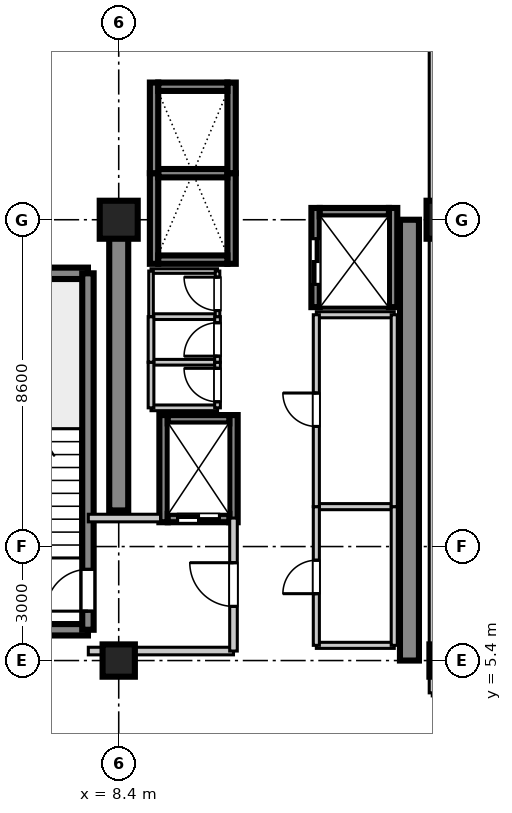
"""IFC4 building model, lengths in metres.
Left out: names, types, materials, properties, quantities, classifications, styles, units other than length and angle.
Written with IfcOpenShell. Run it as: python <this file> out.ifc"""

import sys

from ifc_helpers import new_model, si_unit, direction, frame, frame_2d, origin, origin_2d, place, context, subcontext, project, spatial, rectangle, extrude, source, transform, mapped, element, fill, save


model = new_model("IFC4")
c1 = context("Model", 3, precision=1e-05, world=origin(), true_north=direction((0.0, 1.0)))
c2 = subcontext(c1, "Body", "Model", "MODEL_VIEW")
j1 = project(units=[si_unit("LENGTHUNIT", "METRE"), si_unit("PLANEANGLEUNIT", "RADIAN")], contexts=[c1])
p1 = place(None, origin())
s1 = spatial("IfcSite", under=j1, at=p1, CompositionType="ELEMENT")
p2 = place(p1, origin())
s2 = spatial("IfcBuilding", under=s1, at=p2, CompositionType="ELEMENT")
p3 = place(p2, frame((0.0, 0.0, 212.3)))
s3 = spatial("IfcBuildingStorey", under=s2, at=p3, CompositionType="ELEMENT", Elevation=212.3)
m1 = source(origin(), c2, "Body", "SweptSolid", [
    extrude(rectangle(XDim=0.85, YDim=0.85, at=origin_2d()), origin(), (0.0, 0.0, 1.0), 3.655),
])
p4 = place(p3, frame((8.4, 5.4, 0.0), z_axis=(0.0, 0.0, 1.0), x_axis=(1.0, 0.0, 0.0)))
e1 = element("IfcColumn", 1, at=p4, inside=s3, PredefinedType="PILASTER", context=c2, shape_type="MappedRepresentation", body=[
    mapped(m1, transform((0.0, 0.0, 0.0), scale=1.0)),
])
m2 = source(origin(), c2, "Body", "SweptSolid", [
    extrude(rectangle(XDim=1.0, YDim=1.0, at=origin_2d()), origin(), (0.0, 0.0, 1.0), 3.655),
])
p5 = place(p3, frame((8.4, 17.0, 0.0), z_axis=(0.0, 0.0, 1.0), x_axis=(1.0, 0.0, 0.0)))
e2 = element("IfcColumn", 2, at=p5, inside=s3, PredefinedType="COLUMN", context=c2, shape_type="MappedRepresentation", body=[
    mapped(m2, transform((0.0, 0.0, 0.0), scale=1.0)),
])
p6 = place(p3, frame((17.0, 5.4, 0.0), z_axis=(0.0, 0.0, 1.0), x_axis=(1.0, 0.0, 0.0)))
e3 = element("IfcColumn", 3, at=p6, inside=s3, PredefinedType="PILASTER", context=c2, shape_type="MappedRepresentation", body=[
    mapped(m1, transform((0.0, 0.0, 0.0), scale=1.0)),
])
p7 = place(p3, frame((17.0, 17.0, 0.0), z_axis=(0.0, 0.0, 1.0), x_axis=(1.0, 0.0, 0.0)))
e4 = element("IfcColumn", 4, at=p7, inside=s3, PredefinedType="COLUMN", context=c2, shape_type="MappedRepresentation", body=[
    mapped(m2, transform((0.0, 0.0, 0.0), scale=1.0)),
])
m3 = source(origin(), c2, "Body", "SweptSolid", [
    extrude(rectangle(XDim=7.65, YDim=0.5, at=frame_2d((3.825, 0.0))), origin(), (0.0, 0.0, 1.0), 3.41),
])
p8 = place(p3, frame((8.4, 9.35, 0.0), z_axis=(0.0, 0.0, 1.0), x_axis=(0.0, 1.0, 0.0)))
e5 = element("IfcWall", 5, at=p8, inside=s3, PredefinedType="SHEAR", context=c2, shape_type="MappedRepresentation", body=[
    mapped(m3, transform((0.0, 0.0, 0.0), scale=1.0)),
])
m4 = source(origin(), c2, "Body", "SweptSolid", [
    extrude(rectangle(XDim=11.6, YDim=0.5, at=frame_2d((5.8, 0.0))), origin(), (0.0, 0.0, 1.0), 3.41),
])
p9 = place(p3, frame((16.05, 5.4, 0.0), z_axis=(0.0, 0.0, 1.0), x_axis=(0.0, 1.0, 0.0)))
e6 = element("IfcWall", 6, at=p9, inside=s3, PredefinedType="SHEAR", context=c2, shape_type="MappedRepresentation", body=[
    mapped(m4, transform((0.0, 0.0, 0.0), scale=1.0)),
])
m5 = source(origin(), c2, "Body", "SweptSolid", [
    extrude(rectangle(XDim=3.98, YDim=0.3, at=frame_2d((1.99, 0.0))), origin(), (0.0, 0.0, 1.0), 3.41),
])
for number, where, z_axis, x_axis in (
    (7, (3.61, 6.21, 0.0), (0.0, 0.0, 1.0), (1.0, 0.0, 0.0)),
    (8, (3.61, 15.59, 0.0), (0.0, 0.0, 1.0), (1.0, 0.0, 0.0)),
):
    element("IfcWall", number, at=place(p3, frame(where, z_axis=z_axis, x_axis=x_axis)), inside=s3, PredefinedType="SHEAR", context=c2, shape_type="MappedRepresentation", body=[
        mapped(m5, transform((0.0, 0.0, 0.0), scale=1.0)),
    ])
m6 = source(origin(), c2, "Body", "SweptSolid", [
    extrude(rectangle(XDim=9.38, YDim=0.3, at=frame_2d((4.69, 0.0))), origin(), (0.0, 0.0, 1.0), 3.41),
])
p10 = place(p3, frame((7.59, 6.21, 0.0), z_axis=(0.0, 0.0, 1.0), x_axis=(0.0, 1.0, 0.0)))
e9 = element("IfcWall", 9, at=p10, inside=s3, PredefinedType="SHEAR", context=c2, shape_type="MappedRepresentation", body=[
    mapped(m6, transform((0.0, 0.0, 0.0), scale=1.0)),
])
p11 = place(p10, frame((0.49, 0.0, 0.0)))
e10 = element("IfcOpeningElement", 10, at=p11, cuts=e9, PredefinedType="OPENING", context=c2, shape_type="SweptSolid", body=[
    extrude(rectangle(XDim=1.1, YDim=2.15, at=frame_2d((0.55, 1.075))), frame((0.0, 0.16, 0.0), z_axis=(0.0, -1.0, 0.0), x_axis=(1.0, 0.0, 0.0)), (0.0, 0.0, 1.0), 0.32),
])
m7 = source(origin(), c2, "Body", "SweptSolid", [
    extrude(rectangle(XDim=2.385, YDim=0.22, at=frame_2d((1.192, 0.0))), origin(), (0.0, 0.0, 1.0), 3.41),
])
for number, where, z_axis, x_axis in (
    (11, (9.33, 15.84, 0.0), (0.0, 0.0, 1.0), (0.0, 1.0, 0.0)),
    (12, (11.37, 15.84, 0.0), (0.0, 0.0, 1.0), (0.0, 1.0, 0.0)),
):
    element("IfcWall", number, at=place(p3, frame(where, z_axis=z_axis, x_axis=x_axis)), inside=s3, PredefinedType="SHEAR", context=c2, shape_type="MappedRepresentation", body=[
        mapped(m7, transform((0.0, 0.0, 0.0), scale=1.0)),
    ])
m8 = source(origin(), c2, "Body", "SweptSolid", [
    extrude(rectangle(XDim=1.82, YDim=0.22, at=frame_2d((0.91, 0.0))), origin(), (0.0, 0.0, 1.0), 3.41),
])
p12 = place(p3, frame((9.44, 15.95, 0.0), z_axis=(0.0, 0.0, 1.0), x_axis=(1.0, 0.0, 0.0)))
e13 = element("IfcWall", 13, at=p12, inside=s3, PredefinedType="SHEAR", context=c2, shape_type="MappedRepresentation", body=[
    mapped(m8, transform((0.0, 0.0, 0.0), scale=1.0)),
])
m9 = source(origin(), c2, "Body", "SweptSolid", [
    extrude(rectangle(XDim=1.82, YDim=0.22, at=frame_2d((0.91, 0.0))), origin(), (0.0, 0.0, 1.0), 3.7),
])
p13 = place(p3, frame((9.44, 18.225, 0.0), z_axis=(0.0, 0.0, 1.0), x_axis=(1.0, 0.0, 0.0)))
e14 = element("IfcWall", 14, at=p13, inside=s3, PredefinedType="SHEAR", context=c2, shape_type="MappedRepresentation", body=[
    mapped(m9, transform((0.0, 0.0, 0.0), scale=1.0)),
])
for number, where, z_axis, x_axis in (
    (15, (9.33, 18.225, 0.0), (0.0, 0.0, 1.0), (0.0, 1.0, 0.0)),
    (16, (11.37, 18.225, 0.0), (0.0, 0.0, 1.0), (0.0, 1.0, 0.0)),
):
    element("IfcWall", number, at=place(p3, frame(where, z_axis=z_axis, x_axis=x_axis)), inside=s3, PredefinedType="SHEAR", context=c2, shape_type="MappedRepresentation", body=[
        mapped(m7, transform((0.0, 0.0, 0.0), scale=1.0)),
    ])
p14 = place(p3, frame((9.44, 20.5, 0.0), z_axis=(0.0, 0.0, 1.0), x_axis=(1.0, 0.0, 0.0)))
e17 = element("IfcWall", 17, at=p14, inside=s3, PredefinedType="SHEAR", context=c2, shape_type="MappedRepresentation", body=[
    mapped(m8, transform((0.0, 0.0, 0.0), scale=1.0)),
])
m10 = source(origin(), c2, "Body", "SweptSolid", [
    extrude(rectangle(XDim=2.82, YDim=0.22, at=frame_2d((1.41, 0.0))), origin(), (0.0, 0.0, 1.0), 3.41),
])
for number, where, z_axis, x_axis in (
    (18, (9.58, 9.04, 0.0), (0.0, 0.0, 1.0), (0.0, 1.0, 0.0)),
    (19, (11.42, 9.04, 0.0), (0.0, 0.0, 1.0), (0.0, 1.0, 0.0)),
):
    element("IfcWall", number, at=place(p3, frame(where, z_axis=z_axis, x_axis=x_axis)), inside=s3, PredefinedType="SHEAR", context=c2, shape_type="MappedRepresentation", body=[
        mapped(m10, transform((0.0, 0.0, 0.0), scale=1.0)),
    ])
m11 = source(origin(), c2, "Body", "SweptSolid", [
    extrude(rectangle(XDim=1.62, YDim=0.22, at=frame_2d((0.81, 0.0))), origin(), (0.0, 0.0, 1.0), 3.41),
])
p15 = place(p3, frame((9.69, 9.15, 0.0), z_axis=(0.0, 0.0, 1.0), x_axis=(1.0, 0.0, 0.0)))
e20 = element("IfcWall", 20, at=p15, inside=s3, PredefinedType="SHEAR", context=c2, shape_type="MappedRepresentation", body=[
    mapped(m11, transform((0.0, 0.0, 0.0), scale=1.0)),
])
p16 = place(p15, frame((0.26, 0.0, 0.0)))
e21 = element("IfcOpeningElement", 21, at=p16, cuts=e20, PredefinedType="OPENING", context=c2, shape_type="SweptSolid", body=[
    extrude(rectangle(XDim=1.1, YDim=2.2, at=frame_2d((0.55, 1.1))), frame((0.0, 0.12, 0.0), z_axis=(0.0, -1.0, 0.0), x_axis=(1.0, 0.0, 0.0)), (0.0, 0.0, 1.0), 0.24),
])
p17 = place(p3, frame((9.69, 11.75, 0.0), z_axis=(0.0, 0.0, 1.0), x_axis=(1.0, 0.0, 0.0)))
e22 = element("IfcWall", 22, at=p17, inside=s3, PredefinedType="SHEAR", context=c2, shape_type="MappedRepresentation", body=[
    mapped(m11, transform((0.0, 0.0, 0.0), scale=1.0)),
])
m12 = source(origin(), c2, "Body", "SweptSolid", [
    extrude(rectangle(XDim=2.61, YDim=0.22, at=frame_2d((1.305, 0.0))), origin(), (0.0, 0.0, 1.0), 3.41),
])
p18 = place(p3, frame((13.58, 14.7, 0.0), z_axis=(0.0, 0.0, 1.0), x_axis=(0.0, 1.0, 0.0)))
e23 = element("IfcWall", 23, at=p18, inside=s3, PredefinedType="SHEAR", context=c2, shape_type="MappedRepresentation", body=[
    mapped(m12, transform((0.0, 0.0, 0.0), scale=1.0)),
])
p19 = place(p18, frame((0.6, 0.0, 0.0)))
e24 = element("IfcOpeningElement", 24, at=p19, cuts=e23, PredefinedType="OPENING", context=c2, shape_type="SweptSolid", body=[
    extrude(rectangle(XDim=1.2, YDim=2.2, at=frame_2d((0.6, 1.1))), frame((0.0, 0.12, 0.0), z_axis=(0.0, -1.0, 0.0), x_axis=(1.0, 0.0, 0.0)), (0.0, 0.0, 1.0), 0.24),
])
p20 = place(p3, frame((15.62, 14.7, 0.0), z_axis=(0.0, 0.0, 1.0), x_axis=(0.0, 1.0, 0.0)))
e25 = element("IfcWall", 25, at=p20, inside=s3, PredefinedType="SHEAR", context=c2, shape_type="MappedRepresentation", body=[
    mapped(m12, transform((0.0, 0.0, 0.0), scale=1.0)),
])
p21 = place(p3, frame((13.69, 17.2, 0.0), z_axis=(0.0, 0.0, 1.0), x_axis=(1.0, 0.0, 0.0)))
e26 = element("IfcWall", 26, at=p21, inside=s3, PredefinedType="SHEAR", context=c2, shape_type="MappedRepresentation", body=[
    mapped(m8, transform((0.0, 0.0, 0.0), scale=1.0)),
])
m13 = source(origin(), c2, "Body", "SweptSolid", [
    extrude(rectangle(XDim=3.82, YDim=0.2, at=frame_2d((1.91, 0.0))), origin(), (0.0, 0.0, 1.0), 2.75),
])
p22 = place(p3, frame((7.6, 5.65, 0.0), z_axis=(0.0, 0.0, 1.0), x_axis=(1.0, 0.0, 0.0)))
e27 = element("IfcWall", 27, at=p22, inside=s3, PredefinedType="PARTITIONING", context=c2, shape_type="MappedRepresentation", body=[
    mapped(m13, transform((0.0, 0.0, 0.0), scale=1.0)),
])
m14 = source(origin(), c2, "Body", "SweptSolid", [
    extrude(rectangle(XDim=1.9, YDim=0.2, at=frame_2d((0.95, 0.0))), origin(), (0.0, 0.0, 1.0), 2.75),
])
p23 = place(p3, frame((7.6, 9.15, 0.0), z_axis=(0.0, 0.0, 1.0), x_axis=(1.0, 0.0, 0.0)))
e28 = element("IfcWall", 28, at=p23, inside=s3, PredefinedType="PARTITIONING", context=c2, shape_type="MappedRepresentation", body=[
    mapped(m14, transform((0.0, 0.0, 0.0), scale=1.0)),
])
m15 = source(origin(), c2, "Body", "SweptSolid", [
    extrude(rectangle(XDim=3.5, YDim=0.2, at=frame_2d((1.75, 0.0))), origin(), (0.0, 0.0, 1.0), 2.75),
])
p24 = place(p3, frame((11.42, 5.65, 0.0), z_axis=(0.0, 0.0, 1.0), x_axis=(0.0, 1.0, 0.0)))
e29 = element("IfcWall", 29, at=p24, inside=s3, PredefinedType="PARTITIONING", context=c2, shape_type="MappedRepresentation", body=[
    mapped(m15, transform((0.0, 0.0, 0.0), scale=1.0)),
])
p25 = place(p24, frame((1.175, 0.0, 0.0)))
e30 = element("IfcOpeningElement", 30, at=p25, cuts=e29, PredefinedType="OPENING", context=c2, shape_type="SweptSolid", body=[
    extrude(rectangle(XDim=1.15, YDim=2.15, at=frame_2d((0.575, 1.075))), frame((0.0, 0.11, 0.0), z_axis=(0.0, -1.0, 0.0), x_axis=(1.0, 0.0, 0.0)), (0.0, 0.0, 1.0), 0.22),
])
m16 = source(origin(), c2, "Body", "SweptSolid", [
    extrude(rectangle(XDim=1.75, YDim=0.15, at=frame_2d((0.875, 0.0))), origin(), (0.0, 0.0, 1.0), 2.75),
])
for number, where, z_axis, x_axis in (
    (31, (9.25, 12.05, 0.0), (0.0, 0.0, 1.0), (1.0, 0.0, 0.0)),
    (32, (9.25, 13.25, 0.0), (0.0, 0.0, 1.0), (1.0, 0.0, 0.0)),
):
    element("IfcWall", number, at=place(p3, frame(where, z_axis=z_axis, x_axis=x_axis)), inside=s3, PredefinedType="PARTITIONING", context=c2, shape_type="MappedRepresentation", body=[
        mapped(m16, transform((0.0, 0.0, 0.0), scale=1.0)),
    ])
m17 = source(origin(), c2, "Body", "SweptSolid", [
    extrude(rectangle(XDim=1.2, YDim=0.15, at=frame_2d((0.6, 0.0))), origin(), (0.0, 0.0, 1.0), 2.75),
])
p26 = place(p3, frame((9.25, 12.05, 0.0), z_axis=(0.0, 0.0, 1.0), x_axis=(0.0, 1.0, 0.0)))
e33 = element("IfcWall", 33, at=p26, inside=s3, PredefinedType="PARTITIONING", context=c2, shape_type="MappedRepresentation", body=[
    mapped(m17, transform((0.0, 0.0, 0.0), scale=1.0)),
])
p27 = place(p3, frame((11.0, 12.05, 0.0), z_axis=(0.0, 0.0, 1.0), x_axis=(0.0, 1.0, 0.0)))
e34 = element("IfcWall", 34, at=p27, inside=s3, PredefinedType="PARTITIONING", context=c2, shape_type="MappedRepresentation", body=[
    mapped(m17, transform((0.0, 0.0, 0.0), scale=1.0)),
])
p28 = place(p27, frame((0.16, 0.0, 0.0)))
e35 = element("IfcOpeningElement", 35, at=p28, cuts=e34, PredefinedType="OPENING", context=c2, shape_type="SweptSolid", body=[
    extrude(rectangle(XDim=0.88, YDim=2.1, at=frame_2d((0.44, 1.05))), frame((0.0, 0.085, 0.0), z_axis=(0.0, -1.0, 0.0), x_axis=(1.0, 0.0, 0.0)), (0.0, 0.0, 1.0), 0.17),
])
p29 = place(p3, frame((9.25, 14.45, 0.0), z_axis=(0.0, 0.0, 1.0), x_axis=(1.0, 0.0, 0.0)))
e36 = element("IfcWall", 36, at=p29, inside=s3, PredefinedType="PARTITIONING", context=c2, shape_type="MappedRepresentation", body=[
    mapped(m16, transform((0.0, 0.0, 0.0), scale=1.0)),
])
p30 = place(p3, frame((9.25, 13.25, 0.0), z_axis=(0.0, 0.0, 1.0), x_axis=(0.0, 1.0, 0.0)))
e37 = element("IfcWall", 37, at=p30, inside=s3, PredefinedType="PARTITIONING", context=c2, shape_type="MappedRepresentation", body=[
    mapped(m17, transform((0.0, 0.0, 0.0), scale=1.0)),
])
p31 = place(p3, frame((11.0, 13.25, 0.0), z_axis=(0.0, 0.0, 1.0), x_axis=(0.0, 1.0, 0.0)))
e38 = element("IfcWall", 38, at=p31, inside=s3, PredefinedType="PARTITIONING", context=c2, shape_type="MappedRepresentation", body=[
    mapped(m17, transform((0.0, 0.0, 0.0), scale=1.0)),
])
p32 = place(p31, frame((0.16, 0.0, 0.0)))
e39 = element("IfcOpeningElement", 39, at=p32, cuts=e38, PredefinedType="OPENING", context=c2, shape_type="SweptSolid", body=[
    extrude(rectangle(XDim=0.88, YDim=2.1, at=frame_2d((0.44, 1.05))), frame((0.0, 0.085, 0.0), z_axis=(0.0, -1.0, 0.0), x_axis=(1.0, 0.0, 0.0)), (0.0, 0.0, 1.0), 0.17),
])
m18 = source(origin(), c2, "Body", "SweptSolid", [
    extrude(rectangle(XDim=1.75, YDim=0.12, at=frame_2d((0.875, 0.0))), origin(), (0.0, 0.0, 1.0), 2.75),
])
p33 = place(p3, frame((9.25, 15.65, 0.0), z_axis=(0.0, 0.0, 1.0), x_axis=(1.0, 0.0, 0.0)))
e40 = element("IfcWall", 40, at=p33, inside=s3, PredefinedType="PARTITIONING", context=c2, shape_type="MappedRepresentation", body=[
    mapped(m18, transform((0.0, 0.0, 0.0), scale=1.0)),
])
m19 = source(origin(), c2, "Body", "SweptSolid", [
    extrude(rectangle(XDim=1.2, YDim=0.12, at=frame_2d((0.6, 0.0))), origin(), (0.0, 0.0, 1.0), 2.75),
])
p34 = place(p3, frame((9.25, 14.45, 0.0), z_axis=(0.0, 0.0, 1.0), x_axis=(0.0, 1.0, 0.0)))
e41 = element("IfcWall", 41, at=p34, inside=s3, PredefinedType="PARTITIONING", context=c2, shape_type="MappedRepresentation", body=[
    mapped(m19, transform((0.0, 0.0, 0.0), scale=1.0)),
])
p35 = place(p3, frame((11.0, 14.45, 0.0), z_axis=(0.0, 0.0, 1.0), x_axis=(0.0, 1.0, 0.0)))
e42 = element("IfcWall", 42, at=p35, inside=s3, PredefinedType="PARTITIONING", context=c2, shape_type="MappedRepresentation", body=[
    mapped(m19, transform((0.0, 0.0, 0.0), scale=1.0)),
])
p36 = place(p35, frame((0.16, 0.0, 0.0)))
e43 = element("IfcOpeningElement", 43, at=p36, cuts=e42, PredefinedType="OPENING", context=c2, shape_type="SweptSolid", body=[
    extrude(rectangle(XDim=0.88, YDim=2.1, at=frame_2d((0.44, 1.05))), frame((0.0, 0.07, 0.0), z_axis=(0.0, -1.0, 0.0), x_axis=(1.0, 0.0, 0.0)), (0.0, 0.0, 1.0), 0.14),
])
m20 = source(origin(), c2, "Body", "SweptSolid", [
    extrude(rectangle(XDim=2.05, YDim=0.16, at=frame_2d((1.025, 0.0))), origin(), (0.0, 0.0, 1.0), 2.75),
])
for number, where, z_axis, x_axis in (
    (44, (13.6, 5.8, 0.0), (0.0, 0.0, 1.0), (1.0, 0.0, 0.0)),
    (45, (13.6, 9.45, 0.0), (0.0, 0.0, 1.0), (1.0, 0.0, 0.0)),
):
    element("IfcWall", number, at=place(p3, frame(where, z_axis=z_axis, x_axis=x_axis)), inside=s3, PredefinedType="PARTITIONING", context=c2, shape_type="MappedRepresentation", body=[
        mapped(m20, transform((0.0, 0.0, 0.0), scale=1.0)),
    ])
m21 = source(origin(), c2, "Body", "SweptSolid", [
    extrude(rectangle(XDim=3.65, YDim=0.16, at=frame_2d((1.825, 0.0))), origin(), (0.0, 0.0, 1.0), 2.75),
])
p37 = place(p3, frame((13.6, 5.8, 0.0), z_axis=(0.0, 0.0, 1.0), x_axis=(0.0, 1.0, 0.0)))
e46 = element("IfcWall", 46, at=p37, inside=s3, PredefinedType="PARTITIONING", context=c2, shape_type="MappedRepresentation", body=[
    mapped(m21, transform((0.0, 0.0, 0.0), scale=1.0)),
])
p38 = place(p37, frame((1.36, 0.0, 0.0)))
e47 = element("IfcOpeningElement", 47, at=p38, cuts=e46, PredefinedType="OPENING", context=c2, shape_type="SweptSolid", body=[
    extrude(rectangle(XDim=0.88, YDim=2.1, at=frame_2d((0.44, 1.05))), frame((0.0, 0.09, 0.0), z_axis=(0.0, -1.0, 0.0), x_axis=(1.0, 0.0, 0.0)), (0.0, 0.0, 1.0), 0.18),
])
p39 = place(p3, frame((15.65, 5.8, 0.0), z_axis=(0.0, 0.0, 1.0), x_axis=(0.0, 1.0, 0.0)))
e48 = element("IfcWall", 48, at=p39, inside=s3, PredefinedType="PARTITIONING", context=c2, shape_type="MappedRepresentation", body=[
    mapped(m21, transform((0.0, 0.0, 0.0), scale=1.0)),
])
p40 = place(p3, frame((13.6, 14.5, 0.0), z_axis=(0.0, 0.0, 1.0), x_axis=(1.0, 0.0, 0.0)))
e49 = element("IfcWall", 49, at=p40, inside=s3, PredefinedType="PARTITIONING", context=c2, shape_type="MappedRepresentation", body=[
    mapped(m20, transform((0.0, 0.0, 0.0), scale=1.0)),
])
m22 = source(origin(), c2, "Body", "SweptSolid", [
    extrude(rectangle(XDim=5.05, YDim=0.16, at=frame_2d((2.525, 0.0))), origin(), (0.0, 0.0, 1.0), 2.75),
])
p41 = place(p3, frame((13.6, 9.45, 0.0), z_axis=(0.0, 0.0, 1.0), x_axis=(0.0, 1.0, 0.0)))
e50 = element("IfcWall", 50, at=p41, inside=s3, PredefinedType="PARTITIONING", context=c2, shape_type="MappedRepresentation", body=[
    mapped(m22, transform((0.0, 0.0, 0.0), scale=1.0)),
])
p42 = place(p41, frame((2.11, 0.0, 0.0)))
e51 = element("IfcOpeningElement", 51, at=p42, cuts=e50, PredefinedType="OPENING", context=c2, shape_type="SweptSolid", body=[
    extrude(rectangle(XDim=0.88, YDim=2.1, at=frame_2d((0.44, 1.05))), frame((0.0, 0.09, 0.0), z_axis=(0.0, -1.0, 0.0), x_axis=(1.0, 0.0, 0.0)), (0.0, 0.0, 1.0), 0.18),
])
p43 = place(p3, frame((15.65, 9.45, 0.0), z_axis=(0.0, 0.0, 1.0), x_axis=(0.0, 1.0, 0.0)))
e52 = element("IfcWall", 52, at=p43, inside=s3, PredefinedType="PARTITIONING", context=c2, shape_type="MappedRepresentation", body=[
    mapped(m22, transform((0.0, 0.0, 0.0), scale=1.0)),
])
m23 = source(origin(), c2, "Body", "SweptSolid", [
    extrude(rectangle(XDim=19.35, YDim=0.16, at=frame_2d((9.675, 0.0))), origin(), (0.0, 0.0, 1.0), 2.75),
])
p44 = place(p3, frame((16.65, 4.55, 0.0), z_axis=(0.0, 0.0, 1.0), x_axis=(0.0, 1.0, 0.0)))
e53 = element("IfcWall", 53, at=p44, inside=s3, PredefinedType="PARTITIONING", context=c2, shape_type="MappedRepresentation", body=[
    mapped(m23, transform((0.0, 0.0, 0.0), scale=1.0)),
])
m24 = source(origin(), c2, "Body", "SweptSolid", [
    extrude(rectangle(XDim=1.1, YDim=2.15, at=frame_2d((0.55, 1.075))), frame((0.0, 0.025, 0.0), z_axis=(0.0, -1.0, 0.0), x_axis=(1.0, 0.0, 0.0)), (0.0, 0.0, 1.0), 0.05),
])
p45 = place(p11, origin())
e54 = element("IfcDoor", 54, at=p45, inside=s3, OperationType="SINGLE_SWING_LEFT", PredefinedType="DOOR", context=c2, shape_type="MappedRepresentation", body=[
    mapped(m24, transform((0.0, 0.0, 0.0), scale=1.0)),
])
fill(e10, e54)
m25 = source(origin(), c2, "Body", "SweptSolid", [
    extrude(rectangle(XDim=1.1, YDim=2.2, at=frame_2d((0.55, 1.1))), frame((0.0, 0.025, 0.0), z_axis=(0.0, -1.0, 0.0), x_axis=(1.0, 0.0, 0.0)), (0.0, 0.0, 1.0), 0.05),
])
p46 = place(p16, frame((1.1, 0.0, 0.0), z_axis=(0.0, 0.0, 1.0), x_axis=(-1.0, 0.0, 0.0)))
e55 = element("IfcDoor", 55, at=p46, inside=s3, OperationType="DOUBLE_DOOR_SLIDING", PredefinedType="DOOR", context=c2, shape_type="MappedRepresentation", body=[
    mapped(m25, transform((0.0, 0.0, 0.0), scale=1.0)),
])
fill(e21, e55)
m26 = source(origin(), c2, "Body", "SweptSolid", [
    extrude(rectangle(XDim=1.2, YDim=2.2, at=frame_2d((0.6, 1.1))), frame((0.0, 0.025, 0.0), z_axis=(0.0, -1.0, 0.0), x_axis=(1.0, 0.0, 0.0)), (0.0, 0.0, 1.0), 0.05),
])
p47 = place(p19, origin())
e56 = element("IfcDoor", 56, at=p47, inside=s3, OperationType="DOUBLE_DOOR_SLIDING", PredefinedType="DOOR", context=c2, shape_type="MappedRepresentation", body=[
    mapped(m26, transform((0.0, 0.0, 0.0), scale=1.0)),
])
fill(e24, e56)
m27 = source(origin(), c2, "Body", "SweptSolid", [
    extrude(rectangle(XDim=1.15, YDim=2.15, at=frame_2d((0.575, 1.075))), frame((0.0, 0.025, 0.0), z_axis=(0.0, -1.0, 0.0), x_axis=(1.0, 0.0, 0.0)), (0.0, 0.0, 1.0), 0.05),
])
p48 = place(p25, frame((1.15, 0.0, 0.0), z_axis=(0.0, 0.0, 1.0), x_axis=(-1.0, 0.0, 0.0)))
e57 = element("IfcDoor", 57, at=p48, inside=s3, OperationType="SINGLE_SWING_RIGHT", PredefinedType="DOOR", context=c2, shape_type="MappedRepresentation", body=[
    mapped(m27, transform((0.0, 0.0, 0.0), scale=1.0)),
])
fill(e30, e57)
m28 = source(origin(), c2, "Body", "SweptSolid", [
    extrude(rectangle(XDim=0.88, YDim=2.1, at=frame_2d((0.44, 1.05))), frame((0.0, 0.025, 0.0), z_axis=(0.0, -1.0, 0.0), x_axis=(1.0, 0.0, 0.0)), (0.0, 0.0, 1.0), 0.05),
])
p49 = place(p28, origin())
e58 = element("IfcDoor", 58, at=p49, inside=s3, OperationType="SINGLE_SWING_RIGHT", PredefinedType="DOOR", context=c2, shape_type="MappedRepresentation", body=[
    mapped(m28, transform((0.0, 0.0, 0.0), scale=1.0)),
])
fill(e35, e58)
p50 = place(p32, origin())
e59 = element("IfcDoor", 59, at=p50, inside=s3, OperationType="SINGLE_SWING_LEFT", PredefinedType="DOOR", context=c2, shape_type="MappedRepresentation", body=[
    mapped(m28, transform((0.0, 0.0, 0.0), scale=1.0)),
])
fill(e39, e59)
p51 = place(p36, origin())
e60 = element("IfcDoor", 60, at=p51, inside=s3, OperationType="SINGLE_SWING_RIGHT", PredefinedType="DOOR", context=c2, shape_type="MappedRepresentation", body=[
    mapped(m28, transform((0.0, 0.0, 0.0), scale=1.0)),
])
fill(e43, e60)
p52 = place(p38, frame((0.88, 0.0, 0.0), z_axis=(0.0, 0.0, 1.0), x_axis=(-1.0, 0.0, 0.0)))
e61 = element("IfcDoor", 61, at=p52, inside=s3, OperationType="SINGLE_SWING_LEFT", PredefinedType="DOOR", context=c2, shape_type="MappedRepresentation", body=[
    mapped(m28, transform((0.0, 0.0, 0.0), scale=1.0)),
])
fill(e47, e61)
p53 = place(p42, frame((0.88, 0.0, 0.0), z_axis=(0.0, 0.0, 1.0), x_axis=(-1.0, 0.0, 0.0)))
e62 = element("IfcDoor", 62, at=p53, inside=s3, OperationType="SINGLE_SWING_RIGHT", PredefinedType="DOOR", context=c2, shape_type="MappedRepresentation", body=[
    mapped(m28, transform((0.0, 0.0, 0.0), scale=1.0)),
])
fill(e51, e62)
save(model, sys.argv[1])
